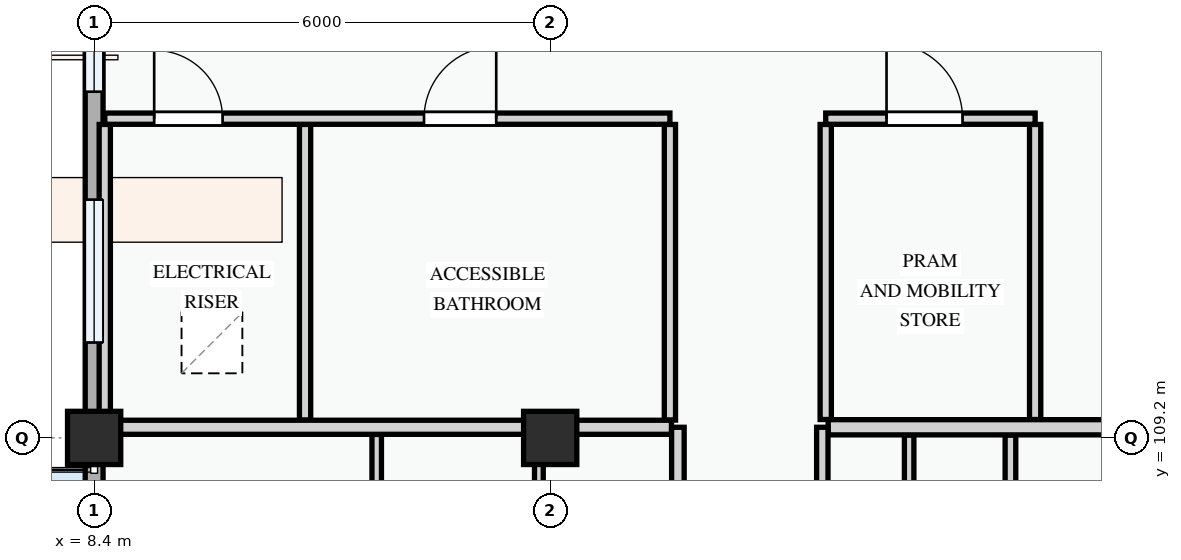
"""IFC4 building model, lengths in metres.
Left out: names, types, materials, properties, quantities, classifications, styles, units other than length and angle.
Written with IfcOpenShell. Run it as: python <this file> out.ifc"""

import sys

from ifc_helpers import new_model, si_unit, direction, frame, frame_2d, origin, origin_2d, place, context, subcontext, project, spatial, rectangle, extrude, element, fill, save


model = new_model("IFC4")
c1 = context("Model", 3, precision=1e-05, world=origin(), true_north=direction((0.0, 1.0)))
c2 = subcontext(c1, "Body", "Model", "MODEL_VIEW")
j1 = project(units=[si_unit("LENGTHUNIT", "METRE"), si_unit("PLANEANGLEUNIT", "RADIAN")], contexts=[c1])
p1 = place(None, origin())
s1 = spatial("IfcSite", under=j1, at=p1, CompositionType="ELEMENT")
p2 = place(p1, origin())
s2 = spatial("IfcBuilding", under=s1, at=p2, CompositionType="ELEMENT")
p3 = place(p2, frame((0.0, 0.0, 11.4)))
s3 = spatial("IfcBuildingStorey", under=s2, at=p3, CompositionType="ELEMENT", Elevation=11.4)
for number, where, z_axis, x_axis in (
    (1, (8.4, 109.2, 0.0), (0.0, 0.0, 1.0), (1.0, 0.0, 0.0)),
    (2, (14.4, 109.2, 0.0), (0.0, 0.0, 1.0), (1.0, 0.0, 0.0)),
):
    element("IfcColumn", number, at=place(p3, frame(where, z_axis=z_axis, x_axis=x_axis)), inside=s3, PredefinedType="COLUMN", context=c2, shape_type="SweptSolid", body=[
        extrude(rectangle(XDim=0.7, YDim=0.7, at=origin_2d()), origin(), (0.0, 0.0, 1.0), 3.3),
    ])
p4 = place(p3, frame((8.4, 115.2, 0.0), z_axis=(0.0, 0.0, 1.0), x_axis=(0.0, -1.0, 0.0)))
e3 = element("IfcWall", 3, at=p4, inside=s3, PredefinedType="STANDARD", context=c2, shape_type="SweptSolid", body=[
    extrude(rectangle(XDim=6.0, YDim=0.235, at=frame_2d((3.0, 0.0))), origin(), (0.0, 0.0, 1.0), 2.575),
])
p5 = place(p4, frame((0.545, 0.0, 0.78)))
e4 = element("IfcOpeningElement", 4, at=p5, cuts=e3, PredefinedType="OPENING", context=c2, shape_type="SweptSolid", body=[
    extrude(rectangle(XDim=0.9, YDim=1.2, at=frame_2d((0.45, 0.6))), frame((0.0, 0.127, 0.0), z_axis=(0.0, -1.0, 0.0), x_axis=(1.0, 0.0, 0.0)), (0.0, 0.0, 1.0), 0.255),
])
p6 = place(p4, frame((2.865, 0.0, 0.78)))
e5 = element("IfcOpeningElement", 5, at=p6, cuts=e3, PredefinedType="OPENING", context=c2, shape_type="SweptSolid", body=[
    extrude(rectangle(XDim=1.88, YDim=1.52, at=frame_2d((0.94, 0.76))), frame((0.0, 0.127, 0.0), z_axis=(0.0, -1.0, 0.0), x_axis=(1.0, 0.0, 0.0)), (0.0, 0.0, 1.0), 0.255),
])
p7 = place(p3, frame((8.4, 109.2, 0.0), z_axis=(0.0, 0.0, 1.0), x_axis=(0.0, -1.0, 0.0)))
e6 = element("IfcWall", 6, at=p7, inside=s3, PredefinedType="STANDARD", context=c2, shape_type="SweptSolid", body=[
    extrude(rectangle(XDim=8.4, YDim=0.235, at=frame_2d((4.2, 0.0))), origin(), (0.0, 0.0, 1.0), 2.425),
])
p8 = place(p7, frame((0.62, 0.0, 0.0)))
e7 = element("IfcOpeningElement", 7, at=p8, cuts=e6, PredefinedType="OPENING", context=c2, shape_type="SweptSolid", body=[
    extrude(rectangle(XDim=1.1, YDim=2.15, at=frame_2d((0.55, 1.075))), frame((0.0, 0.127, 0.0), z_axis=(0.0, -1.0, 0.0), x_axis=(1.0, 0.0, 0.0)), (0.0, 0.0, 1.0), 0.255),
])
p9 = place(p7, frame((3.173, 0.0, 0.78)))
e8 = element("IfcOpeningElement", 8, at=p9, cuts=e6, PredefinedType="OPENING", context=c2, shape_type="SweptSolid", body=[
    extrude(rectangle(XDim=1.25, YDim=1.45, at=frame_2d((0.625, 0.725))), frame((0.0, 0.127, 0.0), z_axis=(0.0, -1.0, 0.0), x_axis=(1.0, 0.0, 0.0)), (0.0, 0.0, 1.0), 0.255),
])
p10 = place(p7, frame((6.367, 0.0, 0.78)))
e9 = element("IfcOpeningElement", 9, at=p10, cuts=e6, PredefinedType="OPENING", context=c2, shape_type="SweptSolid", body=[
    extrude(rectangle(XDim=1.3, YDim=1.4, at=frame_2d((0.65, 0.7))), frame((0.0, 0.127, 0.0), z_axis=(0.0, -1.0, 0.0), x_axis=(1.0, 0.0, 0.0)), (0.0, 0.0, 1.0), 0.255),
])
p11 = place(p3, frame((8.54, 113.324, 0.0), z_axis=(0.0, 0.0, 1.0), x_axis=(0.0, -1.0, 0.0)))
e10 = element("IfcWall", 10, at=p11, inside=s3, PredefinedType="PARTITIONING", context=c2, shape_type="SweptSolid", body=[
    extrude(rectangle(XDim=3.889, YDim=0.148, at=frame_2d((1.945, 0.0))), origin(), (0.0, 0.0, 1.0), 2.575),
])
for number, where, z_axis, x_axis in (
    (11, (11.175, 113.324, 0.0), (0.0, 0.0, 1.0), (0.0, -1.0, 0.0)),
    (12, (15.975, 113.324, 0.0), (0.0, 0.0, 1.0), (0.0, -1.0, 0.0)),
):
    element("IfcWall", number, at=place(p3, frame(where, z_axis=z_axis, x_axis=x_axis)), inside=s3, PredefinedType="PARTITIONING", context=c2, shape_type="SweptSolid", body=[
        extrude(rectangle(XDim=3.889, YDim=0.148, at=frame_2d((1.945, 0.0))), origin(), (0.0, 0.0, 1.0), 3.0),
    ])
for number, where, z_axis, x_axis in (
    (13, (18.025, 113.324, 0.0), (0.0, 0.0, 1.0), (0.0, -1.0, 0.0)),
    (14, (20.78, 113.324, 0.0), (0.0, 0.0, 1.0), (0.0, -1.0, 0.0)),
):
    element("IfcWall", number, at=place(p3, frame(where, z_axis=z_axis, x_axis=x_axis)), inside=s3, PredefinedType="PARTITIONING", context=c2, shape_type="SweptSolid", body=[
        extrude(rectangle(XDim=3.882, YDim=0.148, at=frame_2d((1.941, 0.0))), origin(), (0.0, 0.0, 1.0), 3.0),
    ])
p12 = place(p3, frame((8.54, 113.4, 0.0), z_axis=(0.0, 0.0, 1.0), x_axis=(1.0, 0.0, 0.0)))
e15 = element("IfcWall", 15, at=p12, inside=s3, PredefinedType="PARTITIONING", context=c2, shape_type="SweptSolid", body=[
    extrude(rectangle(XDim=7.435, YDim=0.148, at=frame_2d((3.718, 0.0))), origin(), (0.0, 0.0, 1.0), 3.0),
])
p13 = place(p12, frame((0.65, 0.0, 0.0)))
e16 = element("IfcOpeningElement", 16, at=p13, cuts=e15, PredefinedType="OPENING", context=c2, shape_type="SweptSolid", body=[
    extrude(rectangle(XDim=0.9, YDim=2.1, at=frame_2d((0.45, 1.05))), frame((0.0, 0.084, 0.0), z_axis=(0.0, -1.0, 0.0), x_axis=(1.0, 0.0, 0.0)), (0.0, 0.0, 1.0), 0.168),
])
p14 = place(p12, frame((4.2, 0.0, 0.0)))
e17 = element("IfcOpeningElement", 17, at=p14, cuts=e15, PredefinedType="OPENING", context=c2, shape_type="SweptSolid", body=[
    extrude(rectangle(XDim=0.95, YDim=2.1, at=frame_2d((0.475, 1.05))), frame((0.0, 0.084, 0.0), z_axis=(0.0, -1.0, 0.0), x_axis=(1.0, 0.0, 0.0)), (0.0, 0.0, 1.0), 0.168),
])
p15 = place(p3, frame((18.025, 113.4, 0.0), z_axis=(0.0, 0.0, 1.0), x_axis=(1.0, 0.0, 0.0)))
e18 = element("IfcWall", 18, at=p15, inside=s3, PredefinedType="PARTITIONING", context=c2, shape_type="SweptSolid", body=[
    extrude(rectangle(XDim=2.755, YDim=0.148, at=frame_2d((1.377, 0.0))), origin(), (0.0, 0.0, 1.0), 3.0),
])
p16 = place(p15, frame((0.8, 0.0, 0.0)))
e19 = element("IfcOpeningElement", 19, at=p16, cuts=e18, PredefinedType="OPENING", context=c2, shape_type="SweptSolid", body=[
    extrude(rectangle(XDim=1.0, YDim=2.15, at=frame_2d((0.5, 1.075))), frame((0.0, 0.084, 0.0), z_axis=(0.0, -1.0, 0.0), x_axis=(1.0, 0.0, 0.0)), (0.0, 0.0, 1.0), 0.168),
])
p17 = place(p3, frame((12.118, 103.447, 0.0), z_axis=(0.0, 0.0, 1.0), x_axis=(0.0, 1.0, 0.0)))
e20 = element("IfcWall", 20, at=p17, inside=s3, PredefinedType="PARTITIONING", context=c2, shape_type="SweptSolid", body=[
    extrude(rectangle(XDim=5.799, YDim=0.125, at=frame_2d((2.899, 0.0))), origin(), (0.0, 0.0, 1.0), 3.0),
])
p18 = place(p3, frame((14.251, 103.447, 0.0), z_axis=(0.0, 0.0, 1.0), x_axis=(0.0, 1.0, 0.0)))
e21 = element("IfcWall", 21, at=p18, inside=s3, PredefinedType="PARTITIONING", context=c2, shape_type="SweptSolid", body=[
    extrude(rectangle(XDim=5.799, YDim=0.115, at=frame_2d((2.899, 0.0))), origin(), (0.0, 0.0, 1.0), 2.425),
])
p19 = place(p3, frame((20.455, 103.188, 0.0), z_axis=(0.0, 0.0, 1.0), x_axis=(0.0, 1.0, 0.0)))
e22 = element("IfcWall", 22, at=p19, inside=s3, PredefinedType="PARTITIONING", context=c2, shape_type="SweptSolid", body=[
    extrude(rectangle(XDim=6.05, YDim=0.14, at=frame_2d((3.025, 0.0))), origin(), (0.0, 0.0, 1.0), 3.0),
])
p20 = place(p3, frame((19.122, 103.188, 0.0), z_axis=(0.0, 0.0, 1.0), x_axis=(0.0, 1.0, 0.0)))
e23 = element("IfcWall", 23, at=p20, inside=s3, PredefinedType="PARTITIONING", context=c2, shape_type="SweptSolid", body=[
    extrude(rectangle(XDim=6.05, YDim=0.125, at=frame_2d((3.025, 0.0))), origin(), (0.0, 0.0, 1.0), 3.0),
])
p21 = place(p3, frame((8.52, 109.34, 0.0), z_axis=(0.0, 0.0, 1.0), x_axis=(1.0, 0.0, 0.0)))
e24 = element("IfcWall", 24, at=p21, inside=s3, PredefinedType="PARTITIONING", context=c2, shape_type="SweptSolid", body=[
    extrude(rectangle(XDim=7.476, YDim=0.185, at=frame_2d((3.738, 0.0))), origin(), (0.0, 0.0, 1.0), 2.375),
])
p22 = place(p3, frame((18.057, 109.34, 0.0), z_axis=(0.0, 0.0, 1.0), x_axis=(1.0, 0.0, 0.0)))
e25 = element("IfcWall", 25, at=p22, inside=s3, PredefinedType="PARTITIONING", context=c2, shape_type="SweptSolid", body=[
    extrude(rectangle(XDim=4.683, YDim=0.2, at=frame_2d((2.342, 0.0))), origin(), (0.0, 0.0, 1.0), 2.375),
])
p23 = place(p3, frame((16.08, 72.06, 0.0), z_axis=(0.0, 0.0, 1.0), x_axis=(0.0, 1.0, 0.0)))
e26 = element("IfcWall", 26, at=p23, inside=s3, PredefinedType="PARTITIONING", context=c2, shape_type="SweptSolid", body=[
    extrude(rectangle(XDim=37.28, YDim=0.165, at=frame_2d((18.64, 0.0))), origin(), (0.0, 0.0, 1.0), 3.0),
])
p24 = place(p23, frame((3.722, 0.0, 0.0)))
e27 = element("IfcOpeningElement", 27, at=p24, cuts=e26, PredefinedType="OPENING", context=c2, shape_type="SweptSolid", body=[
    extrude(rectangle(XDim=0.92, YDim=2.1, at=frame_2d((0.46, 1.05))), frame((0.0, 0.093, 0.0), z_axis=(0.0, -1.0, 0.0), x_axis=(1.0, 0.0, 0.0)), (0.0, 0.0, 1.0), 0.185),
])
p25 = place(p23, frame((17.755, 0.0, 0.0)))
e28 = element("IfcOpeningElement", 28, at=p25, cuts=e26, PredefinedType="OPENING", context=c2, shape_type="SweptSolid", body=[
    extrude(rectangle(XDim=0.92, YDim=2.1, at=frame_2d((0.46, 1.05))), frame((0.0, 0.093, 0.0), z_axis=(0.0, -1.0, 0.0), x_axis=(1.0, 0.0, 0.0)), (0.0, 0.0, 1.0), 0.185),
])
p26 = place(p23, frame((25.6, 0.0, 0.0)))
e29 = element("IfcOpeningElement", 29, at=p26, cuts=e26, PredefinedType="OPENING", context=c2, shape_type="SweptSolid", body=[
    extrude(rectangle(XDim=0.96, YDim=2.12, at=frame_2d((0.48, 1.06))), frame((0.0, 0.093, 0.0), z_axis=(0.0, -1.0, 0.0), x_axis=(1.0, 0.0, 0.0)), (0.0, 0.0, 1.0), 0.185),
])
p27 = place(p3, frame((17.98, 72.06, 0.0), z_axis=(0.0, 0.0, 1.0), x_axis=(0.0, 1.0, 0.0)))
e30 = element("IfcWall", 30, at=p27, inside=s3, PredefinedType="PARTITIONING", context=c2, shape_type="SweptSolid", body=[
    extrude(rectangle(XDim=37.28, YDim=0.15, at=frame_2d((18.64, 0.0))), origin(), (0.0, 0.0, 1.0), 3.0),
])
p28 = place(p27, frame((3.684, 0.0, 0.0)))
e31 = element("IfcOpeningElement", 31, at=p28, cuts=e30, PredefinedType="OPENING", context=c2, shape_type="SweptSolid", body=[
    extrude(rectangle(XDim=0.92, YDim=2.1, at=frame_2d((0.46, 1.05))), frame((0.0, 0.085, 0.0), z_axis=(0.0, -1.0, 0.0), x_axis=(1.0, 0.0, 0.0)), (0.0, 0.0, 1.0), 0.17),
])
p29 = place(p27, frame((17.5, 0.0, 0.0)))
e32 = element("IfcOpeningElement", 32, at=p29, cuts=e30, PredefinedType="OPENING", context=c2, shape_type="SweptSolid", body=[
    extrude(rectangle(XDim=0.92, YDim=2.1, at=frame_2d((0.46, 1.05))), frame((0.0, 0.085, 0.0), z_axis=(0.0, -1.0, 0.0), x_axis=(1.0, 0.0, 0.0)), (0.0, 0.0, 1.0), 0.17),
])
p30 = place(p27, frame((25.6, 0.0, 0.0)))
e33 = element("IfcOpeningElement", 33, at=p30, cuts=e30, PredefinedType="OPENING", context=c2, shape_type="SweptSolid", body=[
    extrude(rectangle(XDim=0.92, YDim=2.1, at=frame_2d((0.46, 1.05))), frame((0.0, 0.085, 0.0), z_axis=(0.0, -1.0, 0.0), x_axis=(1.0, 0.0, 0.0)), (0.0, 0.0, 1.0), 0.17),
])
p31 = place(p5, origin())
e34 = element("IfcWindow", 34, at=p31, inside=s3, PartitioningType="SINGLE_PANEL", PredefinedType="WINDOW", context=c2, shape_type="SweptSolid", body=[
    extrude(rectangle(XDim=0.9, YDim=1.2, at=frame_2d((0.45, 0.6))), frame((0.0, 0.03, 0.0), z_axis=(0.0, -1.0, 0.0), x_axis=(1.0, 0.0, 0.0)), (0.0, 0.0, 1.0), 0.06),
])
fill(e4, e34)
p32 = place(p6, origin())
e35 = element("IfcWindow", 35, at=p32, inside=s3, PartitioningType="DOUBLE_PANEL_VERTICAL", PredefinedType="WINDOW", context=c2, shape_type="SweptSolid", body=[
    extrude(rectangle(XDim=1.88, YDim=1.52, at=frame_2d((0.94, 0.76))), frame((0.0, 0.03, 0.0), z_axis=(0.0, -1.0, 0.0), x_axis=(1.0, 0.0, 0.0)), (0.0, 0.0, 1.0), 0.06),
])
fill(e5, e35)
p33 = place(p13, origin())
e36 = element("IfcDoor", 36, at=p33, inside=s3, OperationType="SINGLE_SWING_LEFT", PredefinedType="DOOR", context=c2, shape_type="SweptSolid", body=[
    extrude(rectangle(XDim=0.9, YDim=2.1, at=frame_2d((0.45, 1.05))), frame((0.0, 0.025, 0.0), z_axis=(0.0, -1.0, 0.0), x_axis=(1.0, 0.0, 0.0)), (0.0, 0.0, 1.0), 0.05),
])
fill(e16, e36)
p34 = place(p14, origin())
e37 = element("IfcDoor", 37, at=p34, inside=s3, OperationType="SINGLE_SWING_RIGHT", PredefinedType="DOOR", context=c2, shape_type="SweptSolid", body=[
    extrude(rectangle(XDim=0.95, YDim=2.1, at=frame_2d((0.475, 1.05))), frame((0.0, 0.025, 0.0), z_axis=(0.0, -1.0, 0.0), x_axis=(1.0, 0.0, 0.0)), (0.0, 0.0, 1.0), 0.05),
])
fill(e17, e37)
p35 = place(p16, origin())
e38 = element("IfcDoor", 38, at=p35, inside=s3, OperationType="SINGLE_SWING_LEFT", PredefinedType="DOOR", context=c2, shape_type="SweptSolid", body=[
    extrude(rectangle(XDim=1.0, YDim=2.15, at=frame_2d((0.5, 1.075))), frame((0.0, 0.025, 0.0), z_axis=(0.0, -1.0, 0.0), x_axis=(1.0, 0.0, 0.0)), (0.0, 0.0, 1.0), 0.05),
])
fill(e19, e38)
save(model, sys.argv[1])
